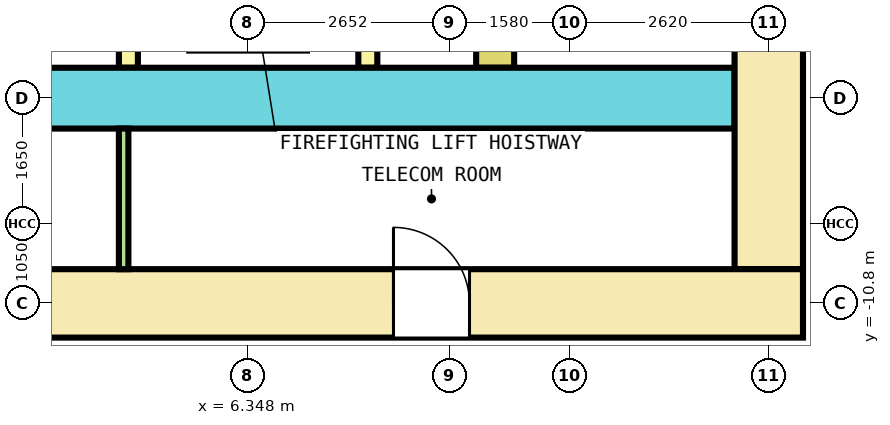
"""IFC4 building model, lengths in metres.
Left out: names, types, materials, properties, quantities, classifications, styles, units other than length and angle.
Written with IfcOpenShell. Run it as: python <this file> out.ifc"""

import sys

from ifc_helpers import new_model, si_unit, direction, frame, frame_2d, origin, place, context, subcontext, project, spatial, rectangle, extrude, element, fill, save


model = new_model("IFC4")
c1 = context("Model", 3, precision=1e-05, world=origin(), true_north=direction((0.0, 1.0)))
c2 = subcontext(c1, "Body", "Model", "MODEL_VIEW")
j1 = project(units=[si_unit("LENGTHUNIT", "METRE"), si_unit("PLANEANGLEUNIT", "RADIAN")], contexts=[c1])
p1 = place(None, origin())
s1 = spatial("IfcSite", under=j1, at=p1, CompositionType="ELEMENT")
p2 = place(p1, origin())
s2 = spatial("IfcBuilding", under=s1, at=p2, CompositionType="ELEMENT")
p3 = place(p2, frame((0.0, 0.0, 41.0)))
s3 = spatial("IfcBuildingStorey", under=s2, at=p3, CompositionType="ELEMENT", Elevation=41.0)
p4 = place(p3, frame((-13.65, -10.8, 0.0), z_axis=(0.0, 0.0, 1.0), x_axis=(1.0, 0.0, 0.0)))
e1 = element("IfcWall", 1, at=p4, inside=s3, PredefinedType="SHEAR", context=c2, shape_type="SweptSolid", body=[
    extrude(rectangle(XDim=27.3, YDim=0.9, at=frame_2d((13.65, 0.0))), origin(), (0.0, 0.0, 1.0), 4.1),
])
p5 = place(p4, frame((1.911, 0.0, 0.0)))
e2 = element("IfcOpeningElement", 2, at=p5, cuts=e1, PredefinedType="OPENING", context=c2, shape_type="SweptSolid", body=[
    extrude(rectangle(XDim=1.0, YDim=2.1, at=frame_2d((0.5, 1.05))), frame((0.0, 0.46, 0.0), z_axis=(0.0, -1.0, 0.0), x_axis=(1.0, 0.0, 0.0)), (0.0, 0.0, 1.0), 0.92),
])
p6 = place(p4, frame((5.027, 0.0, 0.0)))
e3 = element("IfcOpeningElement", 3, at=p6, cuts=e1, PredefinedType="OPENING", context=c2, shape_type="SweptSolid", body=[
    extrude(rectangle(XDim=1.0, YDim=2.1, at=frame_2d((0.5, 1.05))), frame((0.0, 0.46, 0.0), z_axis=(0.0, -1.0, 0.0), x_axis=(1.0, 0.0, 0.0)), (0.0, 0.0, 1.0), 0.92),
])
p7 = place(p4, frame((8.111, 0.0, 0.0)))
e4 = element("IfcOpeningElement", 4, at=p7, cuts=e1, PredefinedType="OPENING", context=c2, shape_type="SweptSolid", body=[
    extrude(rectangle(XDim=1.0, YDim=2.1, at=frame_2d((0.5, 1.05))), frame((0.0, 0.46, 0.0), z_axis=(0.0, -1.0, 0.0), x_axis=(1.0, 0.0, 0.0)), (0.0, 0.0, 1.0), 0.92),
])
p8 = place(p4, frame((11.195, 0.0, 0.0)))
e5 = element("IfcOpeningElement", 5, at=p8, cuts=e1, PredefinedType="OPENING", context=c2, shape_type="SweptSolid", body=[
    extrude(rectangle(XDim=1.0, YDim=2.1, at=frame_2d((0.5, 1.05))), frame((0.0, 0.46, 0.0), z_axis=(0.0, -1.0, 0.0), x_axis=(1.0, 0.0, 0.0)), (0.0, 0.0, 1.0), 0.92),
])
p9 = place(p4, frame((21.913, 0.0, 0.0)))
e6 = element("IfcOpeningElement", 6, at=p9, cuts=e1, PredefinedType="OPENING", context=c2, shape_type="SweptSolid", body=[
    extrude(rectangle(XDim=1.0, YDim=2.1, at=frame_2d((0.5, 1.05))), frame((0.0, 0.46, 0.0), z_axis=(0.0, -1.0, 0.0), x_axis=(1.0, 0.0, 0.0)), (0.0, 0.0, 1.0), 0.92),
])
p10 = place(p4, frame((15.2, 0.0, 0.0)))
e7 = element("IfcOpeningElement", 7, at=p10, cuts=e1, PredefinedType="OPENING", context=c2, shape_type="SweptSolid", body=[
    extrude(rectangle(XDim=1.2, YDim=2.1, at=frame_2d((0.6, 1.05))), frame((0.0, 0.46, 0.0), z_axis=(0.0, -1.0, 0.0), x_axis=(1.0, 0.0, 0.0)), (0.0, 0.0, 1.0), 0.92),
])
p11 = place(p3, frame((13.2, -10.35, 0.0), z_axis=(0.0, 0.0, 1.0), x_axis=(0.0, 1.0, 0.0)))
e8 = element("IfcWall", 8, at=p11, inside=s3, PredefinedType="SHEAR", context=c2, shape_type="SweptSolid", body=[
    extrude(rectangle(XDim=20.7, YDim=0.9, at=frame_2d((10.35, 0.0))), origin(), (0.0, 0.0, 1.0), 4.1),
])
p12 = place(p11, frame((9.15, 0.0, 0.0)))
e9 = element("IfcOpeningElement", 9, at=p12, cuts=e8, PredefinedType="OPENING", context=c2, shape_type="SweptSolid", body=[
    extrude(rectangle(XDim=2.4, YDim=2.1, at=frame_2d((1.2, 1.05))), frame((0.0, 0.46, 0.0), z_axis=(0.0, -1.0, 0.0), x_axis=(1.0, 0.0, 0.0)), (0.0, 0.0, 1.0), 0.92),
])
p13 = place(p11, frame((16.05, 0.0, 0.0)))
e10 = element("IfcOpeningElement", 10, at=p13, cuts=e8, PredefinedType="OPENING", context=c2, shape_type="SweptSolid", body=[
    extrude(rectangle(XDim=1.2, YDim=2.1, at=frame_2d((0.6, 1.05))), frame((0.0, 0.46, 0.0), z_axis=(0.0, -1.0, 0.0), x_axis=(1.0, 0.0, 0.0)), (0.0, 0.0, 1.0), 0.92),
])
p14 = place(p11, frame((3.55, 0.0, 0.0)))
e11 = element("IfcOpeningElement", 11, at=p14, cuts=e8, PredefinedType="OPENING", context=c2, shape_type="SweptSolid", body=[
    extrude(rectangle(XDim=1.0, YDim=2.1, at=frame_2d((0.5, 1.05))), frame((0.0, 0.46, 0.0), z_axis=(0.0, -1.0, 0.0), x_axis=(1.0, 0.0, 0.0)), (0.0, 0.0, 1.0), 0.92),
])
p15 = place(p3, frame((-12.75, -8.1, 0.0), z_axis=(0.0, 0.0, 1.0), x_axis=(1.0, 0.0, 0.0)))
e12 = element("IfcWall", 12, at=p15, inside=s3, PredefinedType="SHEAR", context=c2, shape_type="SweptSolid", body=[
    extrude(rectangle(XDim=25.5, YDim=0.8, at=frame_2d((12.75, 0.0))), origin(), (0.0, 0.0, 1.0), 4.1),
])
p16 = place(p15, frame((14.3, 0.0, 0.0)))
e13 = element("IfcOpeningElement", 13, at=p16, cuts=e12, PredefinedType="OPENING", context=c2, shape_type="SweptSolid", body=[
    extrude(rectangle(XDim=1.2, YDim=2.1, at=frame_2d((0.6, 1.05))), frame((0.0, 0.41, 0.0), z_axis=(0.0, -1.0, 0.0), x_axis=(1.0, 0.0, 0.0)), (0.0, 0.0, 1.0), 0.82),
])
p17 = place(p3, frame((9.6, -7.7, 0.0), z_axis=(0.0, 0.0, 1.0), x_axis=(0.0, 1.0, 0.0)))
e14 = element("IfcWall", 14, at=p17, inside=s3, PredefinedType="SHEAR", context=c2, shape_type="SweptSolid", body=[
    extrude(rectangle(XDim=15.4, YDim=0.5, at=frame_2d((7.7, 0.0))), origin(), (0.0, 0.0, 1.0), 4.1),
])
p18 = place(p17, frame((6.5, 0.0, 0.0)))
e15 = element("IfcOpeningElement", 15, at=p18, cuts=e14, PredefinedType="OPENING", context=c2, shape_type="SweptSolid", body=[
    extrude(rectangle(XDim=2.4, YDim=2.1, at=frame_2d((1.2, 1.05))), frame((0.0, 0.26, 0.0), z_axis=(0.0, -1.0, 0.0), x_axis=(1.0, 0.0, 0.0)), (0.0, 0.0, 1.0), 0.52),
])
p19 = place(p17, frame((13.4, 0.0, 0.0)))
e16 = element("IfcOpeningElement", 16, at=p19, cuts=e14, PredefinedType="OPENING", context=c2, shape_type="SweptSolid", body=[
    extrude(rectangle(XDim=1.2, YDim=2.1, at=frame_2d((0.6, 1.05))), frame((0.0, 0.26, 0.0), z_axis=(0.0, -1.0, 0.0), x_axis=(1.0, 0.0, 0.0)), (0.0, 0.0, 1.0), 0.52),
])
p20 = place(p17, frame((0.9, 0.0, 0.0)))
e17 = element("IfcOpeningElement", 17, at=p20, cuts=e14, PredefinedType="OPENING", context=c2, shape_type="SweptSolid", body=[
    extrude(rectangle(XDim=1.0, YDim=2.1, at=frame_2d((0.5, 1.05))), frame((0.0, 0.26, 0.0), z_axis=(0.0, -1.0, 0.0), x_axis=(1.0, 0.0, 0.0)), (0.0, 0.0, 1.0), 0.52),
])
p21 = place(p3, frame((4.775, -7.7, 0.0), z_axis=(0.0, 0.0, 1.0), x_axis=(0.0, 1.0, 0.0)))
e18 = element("IfcWall", 18, at=p21, inside=s3, PredefinedType="SOLIDWALL", context=c2, shape_type="SweptSolid", body=[
    extrude(rectangle(XDim=2.8, YDim=0.25, at=frame_2d((1.4, 0.0))), origin(), (0.0, 0.0, 1.0), 4.1),
])
p22 = place(p21, frame((0.85, 0.0, 0.0)))
e19 = element("IfcOpeningElement", 19, at=p22, cuts=e18, PredefinedType="OPENING", context=c2, shape_type="SweptSolid", body=[
    extrude(rectangle(XDim=1.1, YDim=2.1, at=frame_2d((0.55, 1.05))), frame((0.0, 0.135, 0.0), z_axis=(0.0, -1.0, 0.0), x_axis=(1.0, 0.0, 0.0)), (0.0, 0.0, 1.0), 0.27),
])
p23 = place(p3, frame((7.925, -7.7, 0.0), z_axis=(0.0, 0.0, 1.0), x_axis=(0.0, 1.0, 0.0)))
e20 = element("IfcWall", 20, at=p23, inside=s3, PredefinedType="SOLIDWALL", context=c2, shape_type="SweptSolid", body=[
    extrude(rectangle(XDim=2.8, YDim=0.25, at=frame_2d((1.4, 0.0))), origin(), (0.0, 0.0, 1.0), 4.1),
])
p24 = place(p3, frame((4.712, -10.35, 0.0), z_axis=(0.0, 0.0, 1.0), x_axis=(0.0, 1.0, 0.0)))
e21 = element("IfcWall", 21, at=p24, inside=s3, PredefinedType="PARTITIONING", context=c2, shape_type="SweptSolid", body=[
    extrude(rectangle(XDim=1.85, YDim=0.125, at=frame_2d((0.925, 0.0))), origin(), (0.0, 0.0, 1.0), 4.1),
])
p25 = place(p9, origin())
e22 = element("IfcDoor", 22, at=p25, inside=s3, OperationType="SINGLE_SWING_LEFT", PredefinedType="DOOR", context=c2, shape_type="SweptSolid", body=[
    extrude(rectangle(XDim=1.0, YDim=2.1, at=frame_2d((0.5, 1.05))), frame((0.0, 0.3, 0.0), z_axis=(0.0, -1.0, 0.0), x_axis=(1.0, 0.0, 0.0)), (0.0, 0.0, 1.0), 0.6),
])
fill(e6, e22)
save(model, sys.argv[1])
